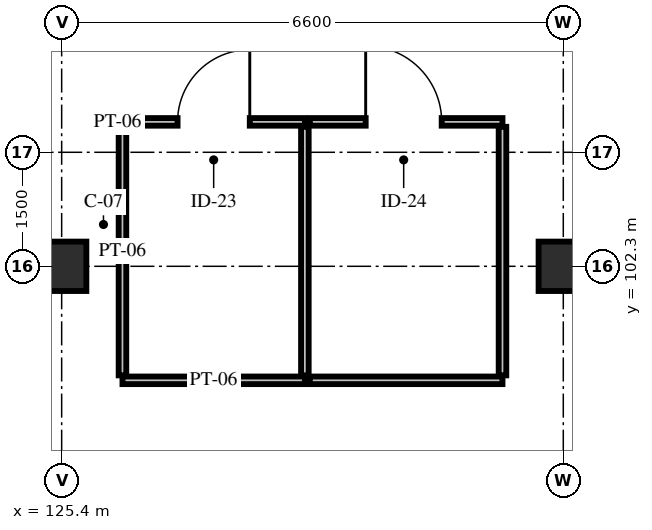
"""IFC4 building model, lengths in metres.
Left out: names, types, materials, properties, quantities, classifications, styles, units other than length and angle.
Written with IfcOpenShell. Run it as: python <this file> out.ifc"""

import sys

from ifc_helpers import new_model, si_unit, direction, frame, frame_2d, origin, origin_2d, place, context, subcontext, project, spatial, rectangle, extrude, element, fill, save


model = new_model("IFC4")
c1 = context("Model", 3, precision=1e-05, world=origin(), true_north=direction((0.0, 1.0)))
c2 = subcontext(c1, "Body", "Model", "MODEL_VIEW")
j1 = project(units=[si_unit("LENGTHUNIT", "METRE"), si_unit("PLANEANGLEUNIT", "RADIAN")], contexts=[c1])
p1 = place(None, origin())
s1 = spatial("IfcSite", under=j1, at=p1, CompositionType="ELEMENT")
p2 = place(p1, origin())
s2 = spatial("IfcBuilding", under=s1, at=p2, CompositionType="ELEMENT")
p3 = place(p2, frame((0.0, 0.0, 24.6)))
s3 = spatial("IfcBuildingStorey", under=s2, at=p3, CompositionType="ELEMENT", Elevation=24.6)
for number, where, z_axis, x_axis in (
    (1, (125.4, 102.3, 0.0), (0.0, 0.0, 1.0), (1.0, 0.0, 0.0)),
    (2, (132.0, 102.3, 0.0), (0.0, 0.0, 1.0), (1.0, 0.0, 0.0)),
):
    element("IfcColumn", number, at=place(p3, frame(where, z_axis=z_axis, x_axis=x_axis)), inside=s3, PredefinedType="COLUMN", context=c2, shape_type="SweptSolid", body=[
        extrude(rectangle(XDim=0.65, YDim=0.65, at=origin_2d()), origin(), (0.0, 0.0, 1.0), 4.8),
    ])
p4 = place(p3, frame((126.2, 100.8, 0.0), z_axis=(0.0, 0.0, 1.0), x_axis=(1.0, 0.0, 0.0)))
e3 = element("IfcWall", 3, at=p4, inside=s3, PredefinedType="PARTITIONING", context=c2, shape_type="SweptSolid", body=[
    extrude(rectangle(XDim=2.4, YDim=0.1, at=frame_2d((1.2, 0.0))), origin(), (0.0, 0.0, 1.0), 4.46),
])
p5 = place(p3, frame((126.2, 104.2, 0.0), z_axis=(0.0, 0.0, 1.0), x_axis=(1.0, 0.0, 0.0)))
e4 = element("IfcWall", 4, at=p5, inside=s3, PredefinedType="PARTITIONING", context=c2, shape_type="SweptSolid", body=[
    extrude(rectangle(XDim=2.4, YDim=0.1, at=frame_2d((1.2, 0.0))), origin(), (0.0, 0.0, 1.0), 4.245),
])
p6 = place(p5, frame((0.725, 0.0, 0.0)))
e5 = element("IfcOpeningElement", 5, at=p6, cuts=e4, PredefinedType="OPENING", context=c2, shape_type="SweptSolid", body=[
    extrude(rectangle(XDim=0.95, YDim=2.15, at=frame_2d((0.475, 1.075))), frame((0.0, 0.065, 0.0), z_axis=(0.0, -1.0, 0.0), x_axis=(1.0, 0.0, 0.0)), (0.0, 0.0, 1.0), 0.13),
])
for number, where, z_axis, x_axis in (
    (6, (126.2, 100.865, 0.0), (0.0, 0.0, 1.0), (0.0, 1.0, 0.0)),
    (7, (128.6, 100.865, 0.0), (0.0, 0.0, 1.0), (0.0, 1.0, 0.0)),
):
    element("IfcWall", number, at=place(p3, frame(where, z_axis=z_axis, x_axis=x_axis)), inside=s3, PredefinedType="PARTITIONING", context=c2, shape_type="SweptSolid", body=[
        extrude(rectangle(XDim=3.27, YDim=0.1, at=frame_2d((1.635, 0.0))), origin(), (0.0, 0.0, 1.0), 4.065),
    ])
p7 = place(p3, frame((128.665, 100.8, 0.0), z_axis=(0.0, 0.0, 1.0), x_axis=(1.0, 0.0, 0.0)))
e8 = element("IfcWall", 8, at=p7, inside=s3, PredefinedType="PARTITIONING", context=c2, shape_type="SweptSolid", body=[
    extrude(rectangle(XDim=2.535, YDim=0.1, at=frame_2d((1.268, 0.0))), origin(), (0.0, 0.0, 1.0), 4.46),
])
p8 = place(p3, frame((128.665, 104.2, 0.0), z_axis=(0.0, 0.0, 1.0), x_axis=(1.0, 0.0, 0.0)))
e9 = element("IfcWall", 9, at=p8, inside=s3, PredefinedType="PARTITIONING", context=c2, shape_type="SweptSolid", body=[
    extrude(rectangle(XDim=2.535, YDim=0.1, at=frame_2d((1.268, 0.0))), origin(), (0.0, 0.0, 1.0), 4.245),
])
p9 = place(p8, frame((0.735, 0.0, 0.0)))
e10 = element("IfcOpeningElement", 10, at=p9, cuts=e9, PredefinedType="OPENING", context=c2, shape_type="SweptSolid", body=[
    extrude(rectangle(XDim=1.0, YDim=2.15, at=frame_2d((0.5, 1.075))), frame((0.0, 0.065, 0.0), z_axis=(0.0, -1.0, 0.0), x_axis=(1.0, 0.0, 0.0)), (0.0, 0.0, 1.0), 0.13),
])
p10 = place(p3, frame((131.2, 100.865, 0.0), z_axis=(0.0, 0.0, 1.0), x_axis=(0.0, 1.0, 0.0)))
e11 = element("IfcWall", 11, at=p10, inside=s3, PredefinedType="PARTITIONING", context=c2, shape_type="SweptSolid", body=[
    extrude(rectangle(XDim=3.27, YDim=0.1, at=frame_2d((1.635, 0.0))), origin(), (0.0, 0.0, 1.0), 4.065),
])
p11 = place(p6, origin())
e12 = element("IfcDoor", 12, at=p11, inside=s3, OperationType="SINGLE_SWING_RIGHT", PredefinedType="DOOR", context=c2, shape_type="SweptSolid", body=[
    extrude(rectangle(XDim=0.95, YDim=2.15, at=frame_2d((0.475, 1.075))), frame((0.0, 0.025, 0.0), z_axis=(0.0, -1.0, 0.0), x_axis=(1.0, 0.0, 0.0)), (0.0, 0.0, 1.0), 0.05),
])
fill(e5, e12)
p12 = place(p9, origin())
e13 = element("IfcDoor", 13, at=p12, inside=s3, OperationType="SINGLE_SWING_LEFT", PredefinedType="DOOR", context=c2, shape_type="SweptSolid", body=[
    extrude(rectangle(XDim=1.0, YDim=2.15, at=frame_2d((0.5, 1.075))), frame((0.0, 0.025, 0.0), z_axis=(0.0, -1.0, 0.0), x_axis=(1.0, 0.0, 0.0)), (0.0, 0.0, 1.0), 0.05),
])
fill(e10, e13)
save(model, sys.argv[1])
